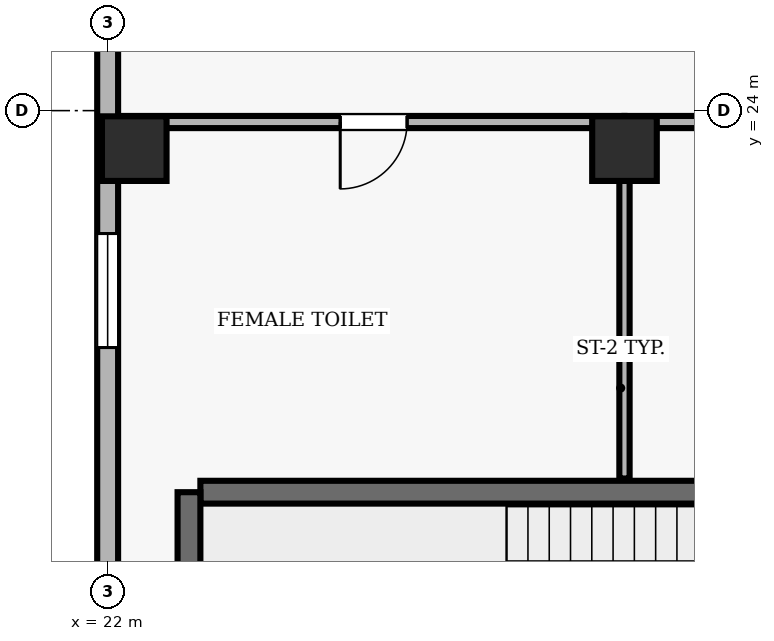
"""IFC4 building model, lengths in metres.
Left out: names, types, materials, properties, quantities, classifications, styles, units other than length and angle.
Written with IfcOpenShell. Run it as: python <this file> out.ifc"""

import sys

from ifc_helpers import new_model, si_unit, direction, frame, frame_2d, origin, origin_2d, place, context, subcontext, project, spatial, rectangle, extrude, element, fill, save


model = new_model("IFC4")
c1 = context("Model", 3, precision=1e-05, world=origin(), true_north=direction((0.0, 1.0)))
c2 = subcontext(c1, "Body", "Model", "MODEL_VIEW")
j1 = project(units=[si_unit("LENGTHUNIT", "METRE"), si_unit("PLANEANGLEUNIT", "RADIAN")], contexts=[c1])
p1 = place(None, origin())
s1 = spatial("IfcSite", under=j1, at=p1, CompositionType="ELEMENT")
p2 = place(p1, origin())
s2 = spatial("IfcBuilding", under=s1, at=p2, CompositionType="ELEMENT")
p3 = place(p2, frame((0.0, 0.0, 298.9)))
s3 = spatial("IfcBuildingStorey", under=s2, at=p3, CompositionType="ELEMENT", Elevation=298.9)
for number, where, z_axis, x_axis in (
    (1, (22.35, 23.5, 0.0), (0.0, 0.0, 1.0), (1.0, 0.0, 0.0)),
    (2, (28.8, 23.5, 0.0), (0.0, 0.0, 1.0), (1.0, 0.0, 0.0)),
):
    element("IfcColumn", number, at=place(p3, frame(where, z_axis=z_axis, x_axis=x_axis)), inside=s3, PredefinedType="COLUMN", context=c2, shape_type="SweptSolid", body=[
        extrude(rectangle(XDim=0.85, YDim=0.85, at=origin_2d()), origin(), (0.0, 0.0, 1.0), 3.9),
    ])
p4 = place(p3, frame((22.0, 35.3, 0.0), z_axis=(0.0, 0.0, 1.0), x_axis=(0.0, -1.0, 0.0)))
e3 = element("IfcWall", 3, at=p4, inside=s3, PredefinedType="SOLIDWALL", context=c2, shape_type="SweptSolid", body=[
    extrude(rectangle(XDim=32.8, YDim=0.275, at=frame_2d((16.4, 0.0))), origin(), (0.0, 0.0, 1.0), 3.69),
])
p5 = place(p4, frame((7.3, 0.0, 0.0)))
e4 = element("IfcOpeningElement", 4, at=p5, cuts=e3, PredefinedType="OPENING", context=c2, shape_type="SweptSolid", body=[
    extrude(rectangle(XDim=1.0, YDim=2.2, at=frame_2d((0.5, 1.1))), frame((0.0, 0.147, 0.0), z_axis=(0.0, -1.0, 0.0), x_axis=(1.0, 0.0, 0.0)), (0.0, 0.0, 1.0), 0.295),
])
p6 = place(p4, frame((1.083, 0.0, 0.9)))
e5 = element("IfcOpeningElement", 5, at=p6, cuts=e3, PredefinedType="OPENING", context=c2, shape_type="SweptSolid", body=[
    extrude(rectangle(XDim=1.5, YDim=1.6, at=frame_2d((0.75, 0.8))), frame((0.0, 0.147, 0.0), z_axis=(0.0, -1.0, 0.0), x_axis=(1.0, 0.0, 0.0)), (0.0, 0.0, 1.0), 0.295),
])
p7 = place(p4, frame((12.917, 0.0, 0.9)))
e6 = element("IfcOpeningElement", 6, at=p7, cuts=e3, PredefinedType="OPENING", context=c2, shape_type="SweptSolid", body=[
    extrude(rectangle(XDim=1.5, YDim=1.6, at=frame_2d((0.75, 0.8))), frame((0.0, 0.147, 0.0), z_axis=(0.0, -1.0, 0.0), x_axis=(1.0, 0.0, 0.0)), (0.0, 0.0, 1.0), 0.295),
])
p8 = place(p4, frame((18.383, 0.0, 0.9)))
e7 = element("IfcOpeningElement", 7, at=p8, cuts=e3, PredefinedType="OPENING", context=c2, shape_type="SweptSolid", body=[
    extrude(rectangle(XDim=1.5, YDim=1.6, at=frame_2d((0.75, 0.8))), frame((0.0, 0.147, 0.0), z_axis=(0.0, -1.0, 0.0), x_axis=(1.0, 0.0, 0.0)), (0.0, 0.0, 1.0), 0.295),
])
p9 = place(p4, frame((23.85, 0.0, 0.9)))
e8 = element("IfcOpeningElement", 8, at=p9, cuts=e3, PredefinedType="OPENING", context=c2, shape_type="SweptSolid", body=[
    extrude(rectangle(XDim=1.5, YDim=1.6, at=frame_2d((0.75, 0.8))), frame((0.0, 0.147, 0.0), z_axis=(0.0, -1.0, 0.0), x_axis=(1.0, 0.0, 0.0)), (0.0, 0.0, 1.0), 0.295),
])
p10 = place(p3, frame((31.58, 18.98, 0.0), z_axis=(0.0, 0.0, 1.0), x_axis=(-1.0, 0.0, 0.0)))
e9 = element("IfcWall", 9, at=p10, inside=s3, PredefinedType="SHEAR", context=c2, shape_type="SweptSolid", body=[
    extrude(rectangle(XDim=8.36, YDim=0.3, at=frame_2d((4.18, 0.0))), origin(), (0.0, 0.0, 1.0), 3.69),
])
p11 = place(p3, frame((23.07, 18.98, 0.0), z_axis=(0.0, 0.0, 1.0), x_axis=(0.0, -1.0, 0.0)))
e10 = element("IfcWall", 10, at=p11, inside=s3, PredefinedType="SHEAR", context=c2, shape_type="SweptSolid", body=[
    extrude(rectangle(XDim=3.51, YDim=0.3, at=frame_2d((1.755, 0.0))), origin(), (0.0, 0.0, 1.0), 3.69),
])
p12 = place(p3, frame((28.8, 23.85, 0.0), z_axis=(0.0, 0.0, 1.0), x_axis=(-1.0, 0.0, 0.0)))
e11 = element("IfcWall", 11, at=p12, inside=s3, PredefinedType="PARTITIONING", context=c2, shape_type="SweptSolid", body=[
    extrude(rectangle(XDim=6.6, YDim=0.16, at=frame_2d((3.3, 0.0))), origin(), (0.0, 0.0, 1.0), 3.227),
])
p13 = place(p12, frame((2.86, 0.0, 0.0)))
e12 = element("IfcOpeningElement", 12, at=p13, cuts=e11, PredefinedType="OPENING", context=c2, shape_type="SweptSolid", body=[
    extrude(rectangle(XDim=0.88, YDim=2.1, at=frame_2d((0.44, 1.05))), frame((0.0, 0.09, 0.0), z_axis=(0.0, -1.0, 0.0), x_axis=(1.0, 0.0, 0.0)), (0.0, 0.0, 1.0), 0.18),
])
p14 = place(p3, frame((31.65, 23.85, 0.0), z_axis=(0.0, 0.0, 1.0), x_axis=(-1.0, 0.0, 0.0)))
e13 = element("IfcWall", 13, at=p14, inside=s3, PredefinedType="PARTITIONING", context=c2, shape_type="SweptSolid", body=[
    extrude(rectangle(XDim=2.85, YDim=0.16, at=frame_2d((1.425, 0.0))), origin(), (0.0, 0.0, 1.0), 3.227),
])
p15 = place(p3, frame((28.8, 23.775, 0.0), z_axis=(0.0, 0.0, 1.0), x_axis=(0.0, -1.0, 0.0)))
e14 = element("IfcWall", 14, at=p15, inside=s3, PredefinedType="PARTITIONING", context=c2, shape_type="SweptSolid", body=[
    extrude(rectangle(XDim=4.615, YDim=0.135, at=frame_2d((2.308, 0.0))), origin(), (0.0, 0.0, 1.0), 3.69),
])
p16 = place(p7, origin())
e15 = element("IfcWindow", 15, at=p16, inside=s3, PartitioningType="SINGLE_PANEL", PredefinedType="WINDOW", context=c2, shape_type="SweptSolid", body=[
    extrude(rectangle(XDim=1.5, YDim=1.6, at=frame_2d((0.75, 0.8))), frame((0.0, 0.03, 0.0), z_axis=(0.0, -1.0, 0.0), x_axis=(1.0, 0.0, 0.0)), (0.0, 0.0, 1.0), 0.06),
])
fill(e6, e15)
p17 = place(p13, origin())
e16 = element("IfcDoor", 16, at=p17, inside=s3, OperationType="SINGLE_SWING_RIGHT", PredefinedType="DOOR", context=c2, shape_type="SweptSolid", body=[
    extrude(rectangle(XDim=0.88, YDim=2.1, at=frame_2d((0.44, 1.05))), frame((0.0, 0.025, 0.0), z_axis=(0.0, -1.0, 0.0), x_axis=(1.0, 0.0, 0.0)), (0.0, 0.0, 1.0), 0.05),
])
fill(e12, e16)
save(model, sys.argv[1])
